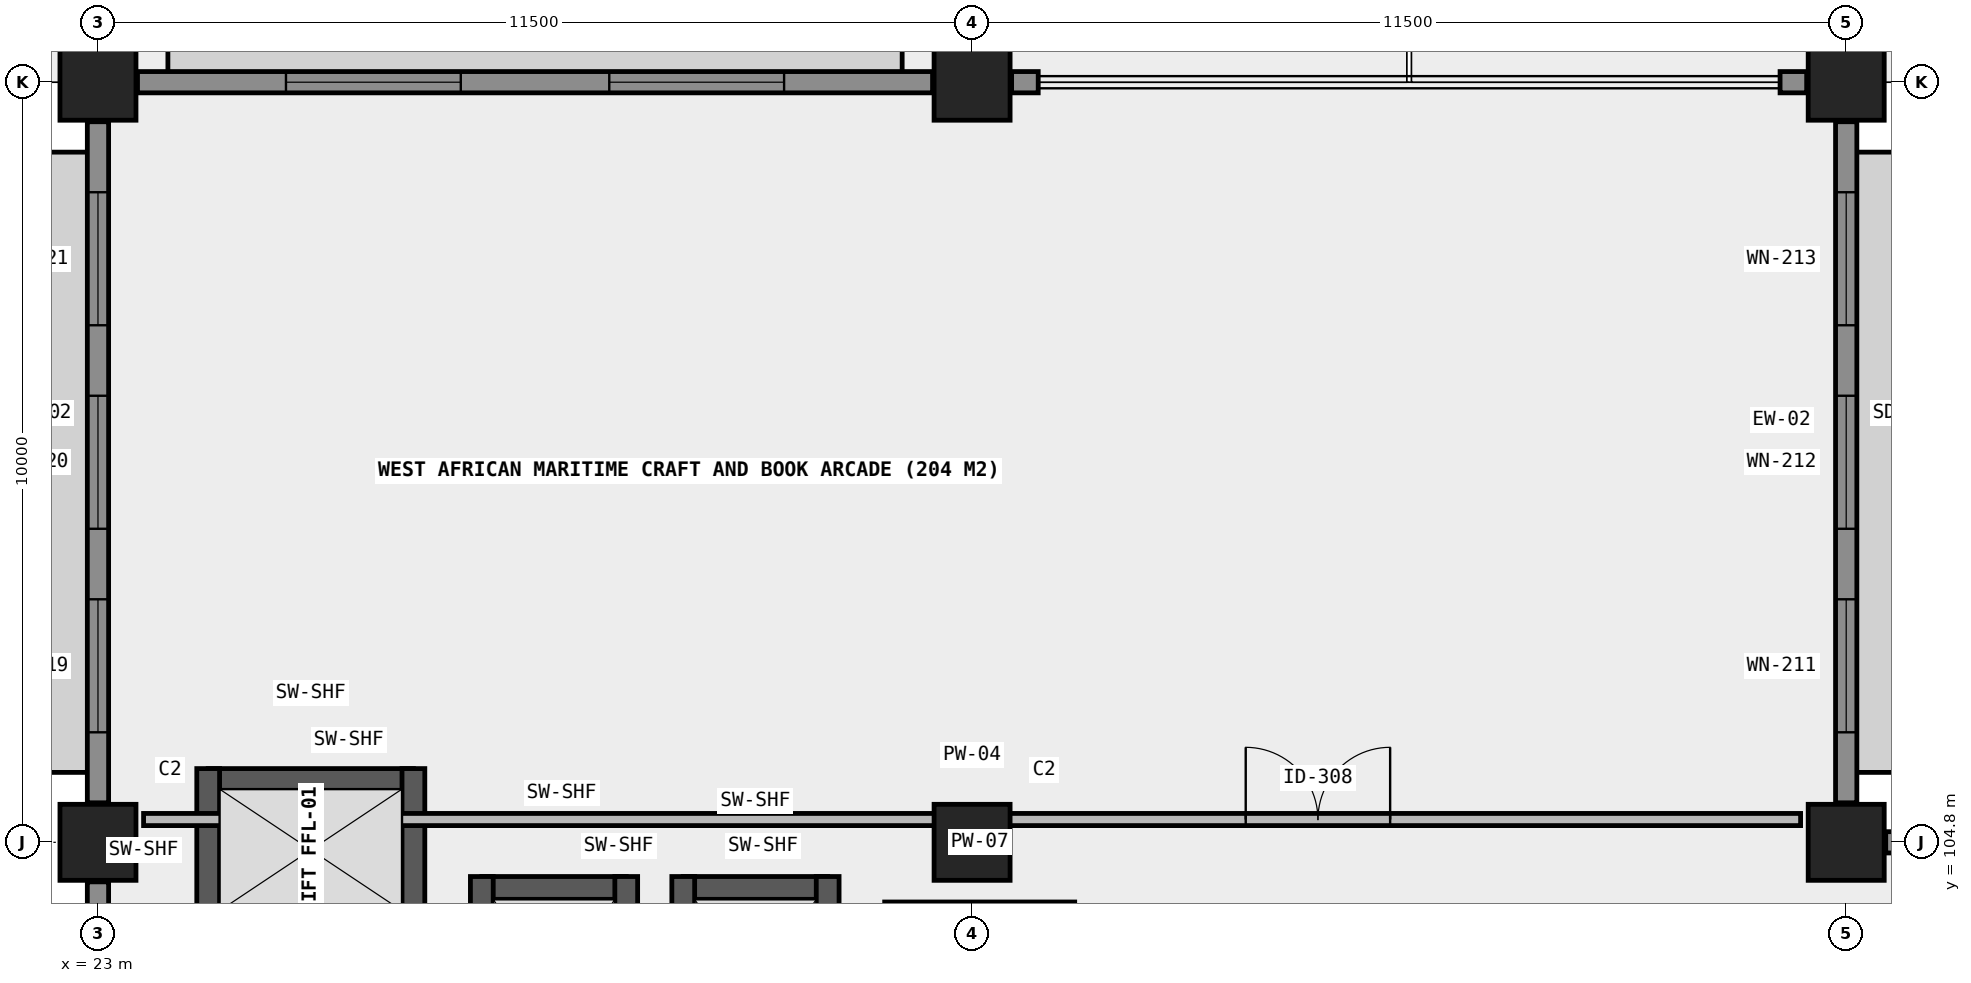
"""IFC4 building model, lengths in metres.
Left out: names, types, materials, properties, quantities, classifications, styles, units other than length and angle.
Written with IfcOpenShell. Run it as: python <this file> out.ifc"""

import sys

from ifc_helpers import new_model, si_unit, direction, frame, frame_2d, origin, origin_2d, place, context, subcontext, project, spatial, rectangle, extrude, element, fill, save


model = new_model("IFC4")
c1 = context("Model", 3, precision=1e-05, world=origin(), true_north=direction((0.0, 1.0)))
c2 = subcontext(c1, "Body", "Model", "MODEL_VIEW")
j1 = project(units=[si_unit("LENGTHUNIT", "METRE"), si_unit("PLANEANGLEUNIT", "RADIAN")], contexts=[c1])
p1 = place(None, origin())
s1 = spatial("IfcSite", under=j1, at=p1, CompositionType="ELEMENT")
p2 = place(p1, origin())
s2 = spatial("IfcBuilding", under=s1, at=p2, CompositionType="ELEMENT")
p3 = place(p2, frame((0.0, 0.0, 4.2)))
s3 = spatial("IfcBuildingStorey", under=s2, at=p3, CompositionType="ELEMENT", Elevation=4.2)
for number, where, z_axis, x_axis in (
    (1, (23.0, 104.8, 0.0), (0.0, 0.0, 1.0), (1.0, 0.0, 0.0)),
    (2, (23.0, 114.8, 0.0), (0.0, 0.0, 1.0), (1.0, 0.0, 0.0)),
    (3, (34.5, 104.8, 0.0), (0.0, 0.0, 1.0), (1.0, 0.0, 0.0)),
    (4, (34.5, 114.8, 0.0), (0.0, 0.0, 1.0), (1.0, 0.0, 0.0)),
    (5, (46.0, 104.8, 0.0), (0.0, 0.0, 1.0), (1.0, 0.0, 0.0)),
    (6, (46.0, 114.8, 0.0), (0.0, 0.0, 1.0), (1.0, 0.0, 0.0)),
):
    element("IfcColumn", number, at=place(p3, frame(where, z_axis=z_axis, x_axis=x_axis)), inside=s3, PredefinedType="COLUMN", context=c2, shape_type="SweptSolid", body=[
        extrude(rectangle(XDim=1.0, YDim=1.0, at=origin_2d()), origin(), (0.0, 0.0, 1.0), 4.2),
    ])
p4 = place(p3, frame((24.45, 105.62, 0.0), z_axis=(0.0, 0.0, 1.0), x_axis=(1.0, 0.0, 0.0)))
e7 = element("IfcWall", 7, at=p4, inside=s3, PredefinedType="SHEAR", context=c2, shape_type="SweptSolid", body=[
    extrude(rectangle(XDim=2.7, YDim=0.3, at=frame_2d((1.35, 0.0))), origin(), (0.0, 0.0, 1.0), 4.2),
])
for number, where, z_axis, x_axis in (
    (8, (24.45, 103.63, 0.0), (0.0, 0.0, 1.0), (0.0, 1.0, 0.0)),
    (9, (27.15, 103.63, 0.0), (0.0, 0.0, 1.0), (0.0, 1.0, 0.0)),
):
    element("IfcWall", number, at=place(p3, frame(where, z_axis=z_axis, x_axis=x_axis)), inside=s3, PredefinedType="SHEAR", context=c2, shape_type="SweptSolid", body=[
        extrude(rectangle(XDim=2.14, YDim=0.3, at=frame_2d((1.07, 0.0))), origin(), (0.0, 0.0, 1.0), 4.2),
    ])
p5 = place(p3, frame((28.05, 104.2, 0.0), z_axis=(0.0, 0.0, 1.0), x_axis=(1.0, 0.0, 0.0)))
e10 = element("IfcWall", 10, at=p5, inside=s3, PredefinedType="SHEAR", context=c2, shape_type="SweptSolid", body=[
    extrude(rectangle(XDim=1.9, YDim=0.3, at=frame_2d((0.95, 0.0))), origin(), (0.0, 0.0, 1.0), 4.2),
])
for number, where, z_axis, x_axis in (
    (11, (28.05, 101.35, 0.0), (0.0, 0.0, 1.0), (0.0, 1.0, 0.0)),
    (12, (29.95, 101.35, 0.0), (0.0, 0.0, 1.0), (0.0, 1.0, 0.0)),
):
    element("IfcWall", number, at=place(p3, frame(where, z_axis=z_axis, x_axis=x_axis)), inside=s3, PredefinedType="SHEAR", context=c2, shape_type="SweptSolid", body=[
        extrude(rectangle(XDim=3.0, YDim=0.3, at=frame_2d((1.5, 0.0))), origin(), (0.0, 0.0, 1.0), 4.2),
    ])
p6 = place(p3, frame((30.7, 104.2, 0.0), z_axis=(0.0, 0.0, 1.0), x_axis=(1.0, 0.0, 0.0)))
e13 = element("IfcWall", 13, at=p6, inside=s3, PredefinedType="SHEAR", context=c2, shape_type="SweptSolid", body=[
    extrude(rectangle(XDim=1.9, YDim=0.3, at=frame_2d((0.95, 0.0))), origin(), (0.0, 0.0, 1.0), 4.2),
])
for number, where, z_axis, x_axis in (
    (14, (30.7, 101.35, 0.0), (0.0, 0.0, 1.0), (0.0, 1.0, 0.0)),
    (15, (32.6, 101.35, 0.0), (0.0, 0.0, 1.0), (0.0, 1.0, 0.0)),
):
    element("IfcWall", number, at=place(p3, frame(where, z_axis=z_axis, x_axis=x_axis)), inside=s3, PredefinedType="SHEAR", context=c2, shape_type="SweptSolid", body=[
        extrude(rectangle(XDim=3.0, YDim=0.3, at=frame_2d((1.5, 0.0))), origin(), (0.0, 0.0, 1.0), 4.2),
    ])
p7 = place(p3, frame((46.52, 104.8, 0.0), z_axis=(0.0, 0.0, 1.0), x_axis=(1.0, 0.0, 0.0)))
e16 = element("IfcWall", 16, at=p7, inside=s3, PredefinedType="SOLIDWALL", context=c2, shape_type="SweptSolid", body=[
    extrude(rectangle(XDim=10.46, YDim=0.28, at=frame_2d((5.23, 0.0))), origin(), (0.0, 0.0, 1.0), 3.15),
])
p8 = place(p7, frame((1.302, 0.0, 0.85)))
e17 = element("IfcOpeningElement", 17, at=p8, cuts=e16, PredefinedType="OPENING", context=c2, shape_type="SweptSolid", body=[
    extrude(rectangle(XDim=1.75, YDim=1.95, at=frame_2d((0.875, 0.975))), frame((0.0, 0.15, 0.0), z_axis=(0.0, -1.0, 0.0), x_axis=(1.0, 0.0, 0.0)), (0.0, 0.0, 1.0), 0.3),
])
p9 = place(p7, frame((4.355, 0.0, 0.85)))
e18 = element("IfcOpeningElement", 18, at=p9, cuts=e16, PredefinedType="OPENING", context=c2, shape_type="SweptSolid", body=[
    extrude(rectangle(XDim=1.75, YDim=1.95, at=frame_2d((0.875, 0.975))), frame((0.0, 0.15, 0.0), z_axis=(0.0, -1.0, 0.0), x_axis=(1.0, 0.0, 0.0)), (0.0, 0.0, 1.0), 0.3),
])
p10 = place(p7, frame((7.407, 0.0, 0.85)))
e19 = element("IfcOpeningElement", 19, at=p10, cuts=e16, PredefinedType="OPENING", context=c2, shape_type="SweptSolid", body=[
    extrude(rectangle(XDim=1.75, YDim=1.95, at=frame_2d((0.875, 0.975))), frame((0.0, 0.15, 0.0), z_axis=(0.0, -1.0, 0.0), x_axis=(1.0, 0.0, 0.0)), (0.0, 0.0, 1.0), 0.3),
])
p11 = place(p3, frame((46.0, 105.32, 0.0), z_axis=(0.0, 0.0, 1.0), x_axis=(0.0, 1.0, 0.0)))
e20 = element("IfcWall", 20, at=p11, inside=s3, PredefinedType="SOLIDWALL", context=c2, shape_type="SweptSolid", body=[
    extrude(rectangle(XDim=8.96, YDim=0.28, at=frame_2d((4.48, 0.0))), origin(), (0.0, 0.0, 1.0), 3.15),
])
p12 = place(p11, frame((0.927, 0.0, 0.85)))
e21 = element("IfcOpeningElement", 21, at=p12, cuts=e20, PredefinedType="OPENING", context=c2, shape_type="SweptSolid", body=[
    extrude(rectangle(XDim=1.75, YDim=1.95, at=frame_2d((0.875, 0.975))), frame((0.0, 0.15, 0.0), z_axis=(0.0, -1.0, 0.0), x_axis=(1.0, 0.0, 0.0)), (0.0, 0.0, 1.0), 0.3),
])
p13 = place(p11, frame((3.605, 0.0, 0.85)))
e22 = element("IfcOpeningElement", 22, at=p13, cuts=e20, PredefinedType="OPENING", context=c2, shape_type="SweptSolid", body=[
    extrude(rectangle(XDim=1.75, YDim=1.95, at=frame_2d((0.875, 0.975))), frame((0.0, 0.15, 0.0), z_axis=(0.0, -1.0, 0.0), x_axis=(1.0, 0.0, 0.0)), (0.0, 0.0, 1.0), 0.3),
])
p14 = place(p11, frame((6.282, 0.0, 0.85)))
e23 = element("IfcOpeningElement", 23, at=p14, cuts=e20, PredefinedType="OPENING", context=c2, shape_type="SweptSolid", body=[
    extrude(rectangle(XDim=1.75, YDim=1.95, at=frame_2d((0.875, 0.975))), frame((0.0, 0.15, 0.0), z_axis=(0.0, -1.0, 0.0), x_axis=(1.0, 0.0, 0.0)), (0.0, 0.0, 1.0), 0.3),
])
p15 = place(p3, frame((23.52, 114.8, 0.0), z_axis=(0.0, 0.0, 1.0), x_axis=(1.0, 0.0, 0.0)))
e24 = element("IfcWall", 24, at=p15, inside=s3, PredefinedType="SOLIDWALL", context=c2, shape_type="SweptSolid", body=[
    extrude(rectangle(XDim=10.46, YDim=0.28, at=frame_2d((5.23, 0.0))), origin(), (0.0, 0.0, 1.0), 3.15),
])
p16 = place(p15, frame((1.953, 0.0, 0.85)))
e25 = element("IfcOpeningElement", 25, at=p16, cuts=e24, PredefinedType="OPENING", context=c2, shape_type="SweptSolid", body=[
    extrude(rectangle(XDim=2.3, YDim=1.95, at=frame_2d((1.15, 0.975))), frame((0.0, 0.15, 0.0), z_axis=(0.0, -1.0, 0.0), x_axis=(1.0, 0.0, 0.0)), (0.0, 0.0, 1.0), 0.3),
])
p17 = place(p15, frame((6.207, 0.0, 0.85)))
e26 = element("IfcOpeningElement", 26, at=p17, cuts=e24, PredefinedType="OPENING", context=c2, shape_type="SweptSolid", body=[
    extrude(rectangle(XDim=2.3, YDim=1.95, at=frame_2d((1.15, 0.975))), frame((0.0, 0.15, 0.0), z_axis=(0.0, -1.0, 0.0), x_axis=(1.0, 0.0, 0.0)), (0.0, 0.0, 1.0), 0.3),
])
for number, where, z_axis, x_axis in (
    (27, (35.02, 114.8, 0.0), (0.0, 0.0, 1.0), (1.0, 0.0, 0.0)),
    (28, (45.13, 114.8, 0.0), (0.0, 0.0, 1.0), (1.0, 0.0, 0.0)),
):
    element("IfcWall", number, at=place(p3, frame(where, z_axis=z_axis, x_axis=x_axis)), inside=s3, PredefinedType="SOLIDWALL", context=c2, shape_type="SweptSolid", body=[
        extrude(rectangle(XDim=0.35, YDim=0.28, at=frame_2d((0.175, 0.0))), origin(), (0.0, 0.0, 1.0), 3.93),
    ])
p18 = place(p3, frame((23.0, 95.32, 0.0), z_axis=(0.0, 0.0, 1.0), x_axis=(0.0, 1.0, 0.0)))
e29 = element("IfcWall", 29, at=p18, inside=s3, PredefinedType="SOLIDWALL", context=c2, shape_type="SweptSolid", body=[
    extrude(rectangle(XDim=8.96, YDim=0.28, at=frame_2d((4.48, 0.0))), origin(), (0.0, 0.0, 1.0), 3.15),
])
p19 = place(p18, frame((0.927, 0.0, 0.85)))
e30 = element("IfcOpeningElement", 30, at=p19, cuts=e29, PredefinedType="OPENING", context=c2, shape_type="SweptSolid", body=[
    extrude(rectangle(XDim=1.75, YDim=1.95, at=frame_2d((0.875, 0.975))), frame((0.0, 0.15, 0.0), z_axis=(0.0, -1.0, 0.0), x_axis=(1.0, 0.0, 0.0)), (0.0, 0.0, 1.0), 0.3),
])
p20 = place(p18, frame((3.605, 0.0, 0.85)))
e31 = element("IfcOpeningElement", 31, at=p20, cuts=e29, PredefinedType="OPENING", context=c2, shape_type="SweptSolid", body=[
    extrude(rectangle(XDim=1.75, YDim=1.95, at=frame_2d((0.875, 0.975))), frame((0.0, 0.15, 0.0), z_axis=(0.0, -1.0, 0.0), x_axis=(1.0, 0.0, 0.0)), (0.0, 0.0, 1.0), 0.3),
])
p21 = place(p18, frame((6.282, 0.0, 0.85)))
e32 = element("IfcOpeningElement", 32, at=p21, cuts=e29, PredefinedType="OPENING", context=c2, shape_type="SweptSolid", body=[
    extrude(rectangle(XDim=1.75, YDim=1.95, at=frame_2d((0.875, 0.975))), frame((0.0, 0.15, 0.0), z_axis=(0.0, -1.0, 0.0), x_axis=(1.0, 0.0, 0.0)), (0.0, 0.0, 1.0), 0.3),
])
p22 = place(p3, frame((23.0, 105.32, 0.0), z_axis=(0.0, 0.0, 1.0), x_axis=(0.0, 1.0, 0.0)))
e33 = element("IfcWall", 33, at=p22, inside=s3, PredefinedType="SOLIDWALL", context=c2, shape_type="SweptSolid", body=[
    extrude(rectangle(XDim=8.96, YDim=0.28, at=frame_2d((4.48, 0.0))), origin(), (0.0, 0.0, 1.0), 3.15),
])
p23 = place(p22, frame((0.927, 0.0, 0.85)))
e34 = element("IfcOpeningElement", 34, at=p23, cuts=e33, PredefinedType="OPENING", context=c2, shape_type="SweptSolid", body=[
    extrude(rectangle(XDim=1.75, YDim=1.95, at=frame_2d((0.875, 0.975))), frame((0.0, 0.15, 0.0), z_axis=(0.0, -1.0, 0.0), x_axis=(1.0, 0.0, 0.0)), (0.0, 0.0, 1.0), 0.3),
])
p24 = place(p22, frame((3.605, 0.0, 0.85)))
e35 = element("IfcOpeningElement", 35, at=p24, cuts=e33, PredefinedType="OPENING", context=c2, shape_type="SweptSolid", body=[
    extrude(rectangle(XDim=1.75, YDim=1.95, at=frame_2d((0.875, 0.975))), frame((0.0, 0.15, 0.0), z_axis=(0.0, -1.0, 0.0), x_axis=(1.0, 0.0, 0.0)), (0.0, 0.0, 1.0), 0.3),
])
p25 = place(p22, frame((6.282, 0.0, 0.85)))
e36 = element("IfcOpeningElement", 36, at=p25, cuts=e33, PredefinedType="OPENING", context=c2, shape_type="SweptSolid", body=[
    extrude(rectangle(XDim=1.75, YDim=1.95, at=frame_2d((0.875, 0.975))), frame((0.0, 0.15, 0.0), z_axis=(0.0, -1.0, 0.0), x_axis=(1.0, 0.0, 0.0)), (0.0, 0.0, 1.0), 0.3),
])
p26 = place(p3, frame((33.35, 103.95, 0.0), z_axis=(0.0, 0.0, 1.0), x_axis=(1.0, 0.0, 0.0)))
e37 = element("IfcWall", 37, at=p26, inside=s3, PredefinedType="PLUMBINGWALL", context=c2, shape_type="SweptSolid", body=[
    extrude(rectangle(XDim=2.5, YDim=0.13, at=frame_2d((1.25, 0.0))), origin(), (0.0, 0.0, 1.0), 3.84),
])
p27 = place(p3, frame((23.6, 105.1, 0.0), z_axis=(0.0, 0.0, 1.0), x_axis=(1.0, 0.0, 0.0)))
e38 = element("IfcWall", 38, at=p27, inside=s3, PredefinedType="PARTITIONING", context=c2, shape_type="SweptSolid", body=[
    extrude(rectangle(XDim=21.8, YDim=0.16, at=frame_2d((10.9, 0.0))), origin(), (0.0, 0.0, 1.0), 3.84),
])
p28 = place(p27, frame((14.5, 0.0, 0.0)))
e39 = element("IfcOpeningElement", 39, at=p28, cuts=e38, PredefinedType="OPENING", context=c2, shape_type="SweptSolid", body=[
    extrude(rectangle(XDim=1.9, YDim=2.35, at=frame_2d((0.95, 1.175))), frame((0.0, 0.09, 0.0), z_axis=(0.0, -1.0, 0.0), x_axis=(1.0, 0.0, 0.0)), (0.0, 0.0, 1.0), 0.18),
])
p29 = place(p12, origin())
e40 = element("IfcWindow", 40, at=p29, inside=s3, PartitioningType="SINGLE_PANEL", PredefinedType="WINDOW", context=c2, shape_type="SweptSolid", body=[
    extrude(rectangle(XDim=1.75, YDim=1.95, at=frame_2d((0.875, 0.975))), frame((0.0, 0.03, 0.0), z_axis=(0.0, -1.0, 0.0), x_axis=(1.0, 0.0, 0.0)), (0.0, 0.0, 1.0), 0.06),
])
fill(e21, e40)
p30 = place(p13, origin())
e41 = element("IfcWindow", 41, at=p30, inside=s3, PartitioningType="SINGLE_PANEL", PredefinedType="WINDOW", context=c2, shape_type="SweptSolid", body=[
    extrude(rectangle(XDim=1.75, YDim=1.95, at=frame_2d((0.875, 0.975))), frame((0.0, 0.03, 0.0), z_axis=(0.0, -1.0, 0.0), x_axis=(1.0, 0.0, 0.0)), (0.0, 0.0, 1.0), 0.06),
])
fill(e22, e41)
p31 = place(p14, origin())
e42 = element("IfcWindow", 42, at=p31, inside=s3, PartitioningType="SINGLE_PANEL", PredefinedType="WINDOW", context=c2, shape_type="SweptSolid", body=[
    extrude(rectangle(XDim=1.75, YDim=1.95, at=frame_2d((0.875, 0.975))), frame((0.0, 0.03, 0.0), z_axis=(0.0, -1.0, 0.0), x_axis=(1.0, 0.0, 0.0)), (0.0, 0.0, 1.0), 0.06),
])
fill(e23, e42)
p32 = place(p16, origin())
e43 = element("IfcWindow", 43, at=p32, inside=s3, PartitioningType="SINGLE_PANEL", PredefinedType="WINDOW", context=c2, shape_type="SweptSolid", body=[
    extrude(rectangle(XDim=2.3, YDim=1.95, at=frame_2d((1.15, 0.975))), frame((0.0, 0.03, 0.0), z_axis=(0.0, -1.0, 0.0), x_axis=(1.0, 0.0, 0.0)), (0.0, 0.0, 1.0), 0.06),
])
fill(e25, e43)
p33 = place(p17, origin())
e44 = element("IfcWindow", 44, at=p33, inside=s3, PartitioningType="SINGLE_PANEL", PredefinedType="WINDOW", context=c2, shape_type="SweptSolid", body=[
    extrude(rectangle(XDim=2.3, YDim=1.95, at=frame_2d((1.15, 0.975))), frame((0.0, 0.03, 0.0), z_axis=(0.0, -1.0, 0.0), x_axis=(1.0, 0.0, 0.0)), (0.0, 0.0, 1.0), 0.06),
])
fill(e26, e44)
p34 = place(p23, origin())
e45 = element("IfcWindow", 45, at=p34, inside=s3, PartitioningType="SINGLE_PANEL", PredefinedType="WINDOW", context=c2, shape_type="SweptSolid", body=[
    extrude(rectangle(XDim=1.75, YDim=1.95, at=frame_2d((0.875, 0.975))), frame((0.0, 0.03, 0.0), z_axis=(0.0, -1.0, 0.0), x_axis=(1.0, 0.0, 0.0)), (0.0, 0.0, 1.0), 0.06),
])
fill(e34, e45)
p35 = place(p24, origin())
e46 = element("IfcWindow", 46, at=p35, inside=s3, PartitioningType="SINGLE_PANEL", PredefinedType="WINDOW", context=c2, shape_type="SweptSolid", body=[
    extrude(rectangle(XDim=1.75, YDim=1.95, at=frame_2d((0.875, 0.975))), frame((0.0, 0.03, 0.0), z_axis=(0.0, -1.0, 0.0), x_axis=(1.0, 0.0, 0.0)), (0.0, 0.0, 1.0), 0.06),
])
fill(e35, e46)
p36 = place(p25, origin())
e47 = element("IfcWindow", 47, at=p36, inside=s3, PartitioningType="SINGLE_PANEL", PredefinedType="WINDOW", context=c2, shape_type="SweptSolid", body=[
    extrude(rectangle(XDim=1.75, YDim=1.95, at=frame_2d((0.875, 0.975))), frame((0.0, 0.03, 0.0), z_axis=(0.0, -1.0, 0.0), x_axis=(1.0, 0.0, 0.0)), (0.0, 0.0, 1.0), 0.06),
])
fill(e36, e47)
p37 = place(p28, origin())
e48 = element("IfcDoor", 48, at=p37, inside=s3, OperationType="DOUBLE_DOOR_SINGLE_SWING", PredefinedType="DOOR", context=c2, shape_type="SweptSolid", body=[
    extrude(rectangle(XDim=1.9, YDim=2.35, at=frame_2d((0.95, 1.175))), frame((0.0, 0.025, 0.0), z_axis=(0.0, -1.0, 0.0), x_axis=(1.0, 0.0, 0.0)), (0.0, 0.0, 1.0), 0.05),
])
fill(e39, e48)
save(model, sys.argv[1])
